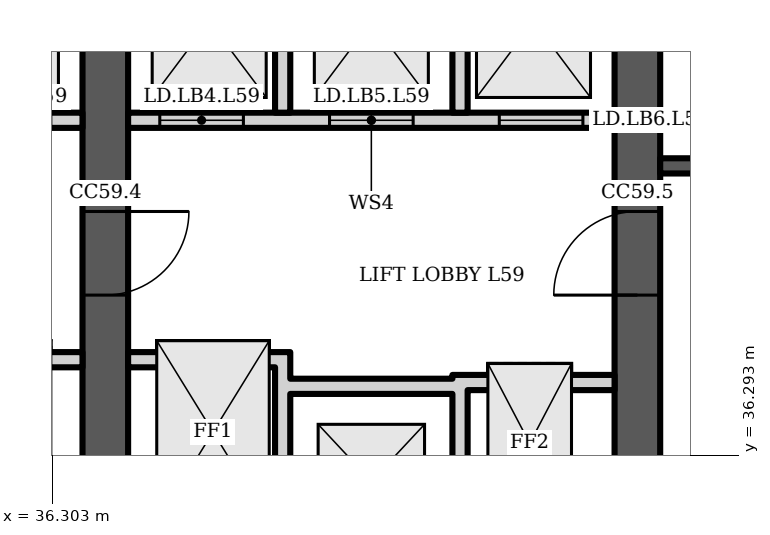
"""IFC4 building model, lengths in metres.
Left out: names, types, materials, properties, quantities, classifications, styles, units other than length and angle.
Written with IfcOpenShell. Run it as: python <this file> out.ifc"""

import sys

from ifc_helpers import new_model, si_unit, direction, frame, frame_2d, origin, place, context, subcontext, project, spatial, polyline, rectangle, outline, extrude, element, fill, save


model = new_model("IFC4")
c1 = context("Model", 3, precision=1e-05, world=origin(), true_north=direction((0.0, 1.0)))
c2 = subcontext(c1, "Body", "Model", "MODEL_VIEW")
j1 = project(units=[si_unit("LENGTHUNIT", "METRE"), si_unit("PLANEANGLEUNIT", "RADIAN")], contexts=[c1])
p1 = place(None, origin())
s1 = spatial("IfcSite", under=j1, at=p1, CompositionType="ELEMENT")
p2 = place(p1, origin())
s2 = spatial("IfcBuilding", under=s1, at=p2, CompositionType="ELEMENT")
p3 = place(p2, frame((0.0, 0.0, 235.9)))
s3 = spatial("IfcBuildingStorey", under=s2, at=p3, CompositionType="ELEMENT", Elevation=235.9)
p4 = place(p3, frame((37.0, 34.6, 0.0), z_axis=(0.0, 0.0, 1.0), x_axis=(0.0, 1.0, 0.0)))
e1 = element("IfcWall", 1, at=p4, inside=s3, PredefinedType="SHEAR", context=c2, shape_type="SweptSolid", body=[
    extrude(rectangle(XDim=14.784, YDim=0.6, at=frame_2d((7.392, 0.0))), origin(), (0.0, 0.0, 1.0), 3.6),
])
p5 = place(p4, frame((11.302, 0.0, 0.0)))
e2 = element("IfcOpeningElement", 2, at=p5, cuts=e1, PredefinedType="OPENING", context=c2, shape_type="SweptSolid", body=[
    extrude(rectangle(XDim=1.0, YDim=2.1, at=frame_2d((0.5, 1.05))), frame((0.0, 0.31, 0.0), z_axis=(0.0, -1.0, 0.0), x_axis=(1.0, 0.0, 0.0)), (0.0, 0.0, 1.0), 0.62),
])
p6 = place(p4, frame((3.8, 0.0, 0.0)))
e3 = element("IfcOpeningElement", 3, at=p6, cuts=e1, PredefinedType="OPENING", context=c2, shape_type="SweptSolid", body=[
    extrude(rectangle(XDim=1.1, YDim=2.1, at=frame_2d((0.55, 1.05))), frame((0.0, 0.31, 0.0), z_axis=(0.0, -1.0, 0.0), x_axis=(1.0, 0.0, 0.0)), (0.0, 0.0, 1.0), 0.62),
])
p7 = place(p3, frame((44.0, 34.6, 0.0), z_axis=(0.0, 0.0, 1.0), x_axis=(0.0, 1.0, 0.0)))
e4 = element("IfcWall", 4, at=p7, inside=s3, PredefinedType="SHEAR", context=c2, shape_type="SweptSolid", body=[
    extrude(rectangle(XDim=14.784, YDim=0.6, at=frame_2d((7.392, 0.0))), origin(), (0.0, 0.0, 1.0), 3.6),
])
p8 = place(p7, frame((11.608, 0.0, 0.0)))
e5 = element("IfcOpeningElement", 5, at=p8, cuts=e4, PredefinedType="OPENING", context=c2, shape_type="SweptSolid", body=[
    extrude(rectangle(XDim=1.0, YDim=2.1, at=frame_2d((0.5, 1.05))), frame((0.0, 0.31, 0.0), z_axis=(0.0, -1.0, 0.0), x_axis=(1.0, 0.0, 0.0)), (0.0, 0.0, 1.0), 0.62),
])
p9 = place(p7, frame((3.8, 0.0, 0.0)))
e6 = element("IfcOpeningElement", 6, at=p9, cuts=e4, PredefinedType="OPENING", context=c2, shape_type="SweptSolid", body=[
    extrude(rectangle(XDim=1.1, YDim=2.1, at=frame_2d((0.55, 1.05))), frame((0.0, 0.31, 0.0), z_axis=(0.0, -1.0, 0.0), x_axis=(1.0, 0.0, 0.0)), (0.0, 0.0, 1.0), 0.62),
])
p10 = place(p3, frame((30.3, 40.7, 0.0), z_axis=(0.0, 0.0, 1.0), x_axis=(1.0, 0.0, 0.0)))
e7 = element("IfcWall", 7, at=p10, inside=s3, PredefinedType="PARTITIONING", context=c2, shape_type="SweptSolid", body=[
    extrude(rectangle(XDim=6.4, YDim=0.2, at=frame_2d((3.2, 0.0))), origin(), (0.0, 0.0, 1.0), 3.2),
])
p11 = place(p10, frame((0.417, 0.0, 0.0)))
e8 = element("IfcOpeningElement", 8, at=p11, cuts=e7, PredefinedType="OPENING", context=c2, shape_type="SweptSolid", body=[
    extrude(rectangle(XDim=1.1, YDim=2.1, at=frame_2d((0.55, 1.05))), frame((0.0, 0.11, 0.0), z_axis=(0.0, -1.0, 0.0), x_axis=(1.0, 0.0, 0.0)), (0.0, 0.0, 1.0), 0.22),
])
p12 = place(p10, frame((2.65, 0.0, 0.0)))
e9 = element("IfcOpeningElement", 9, at=p12, cuts=e7, PredefinedType="OPENING", context=c2, shape_type="SweptSolid", body=[
    extrude(rectangle(XDim=1.1, YDim=2.1, at=frame_2d((0.55, 1.05))), frame((0.0, 0.11, 0.0), z_axis=(0.0, -1.0, 0.0), x_axis=(1.0, 0.0, 0.0)), (0.0, 0.0, 1.0), 0.22),
])
p13 = place(p10, frame((4.883, 0.0, 0.0)))
e10 = element("IfcOpeningElement", 10, at=p13, cuts=e7, PredefinedType="OPENING", context=c2, shape_type="SweptSolid", body=[
    extrude(rectangle(XDim=1.1, YDim=2.1, at=frame_2d((0.55, 1.05))), frame((0.0, 0.11, 0.0), z_axis=(0.0, -1.0, 0.0), x_axis=(1.0, 0.0, 0.0)), (0.0, 0.0, 1.0), 0.22),
])
p14 = place(p3, origin())
e11 = element("IfcWall", 11, at=p14, inside=s3, PredefinedType="PARTITIONING", context=c2, shape_type="SweptSolid", body=[
    extrude(outline(polyline([(34.567, 37.65), (34.767, 37.65), (36.7, 37.65), (36.7, 37.45), (34.767, 37.45), (34.767, 34.6), (34.567, 34.6), (34.567, 37.65)])), origin(), (0.0, 0.0, 1.0), 3.2),
])
p15 = place(p3, origin())
e12 = element("IfcWall", 12, at=p15, inside=s3, PredefinedType="PARTITIONING", context=c2, shape_type="SweptSolid", body=[
    extrude(outline(polyline([(32.433, 40.8), (32.233, 40.8), (32.233, 43.8), (30.3, 43.8), (30.3, 44.0), (36.7, 44.0), (36.7, 43.8), (34.767, 43.8), (34.767, 40.8), (34.567, 40.8), (34.567, 43.8), (32.433, 43.8), (32.433, 40.8)])), origin(), (0.0, 0.0, 1.0), 3.2),
])
p16 = place(p3, frame((37.3, 40.7, 0.0), z_axis=(0.0, 0.0, 1.0), x_axis=(1.0, 0.0, 0.0)))
e13 = element("IfcWall", 13, at=p16, inside=s3, PredefinedType="PARTITIONING", context=c2, shape_type="SweptSolid", body=[
    extrude(rectangle(XDim=6.4, YDim=0.2, at=frame_2d((3.2, 0.0))), origin(), (0.0, 0.0, 1.0), 3.2),
])
p17 = place(p16, frame((0.417, 0.0, 0.0)))
e14 = element("IfcOpeningElement", 14, at=p17, cuts=e13, PredefinedType="OPENING", context=c2, shape_type="SweptSolid", body=[
    extrude(rectangle(XDim=1.1, YDim=2.1, at=frame_2d((0.55, 1.05))), frame((0.0, 0.11, 0.0), z_axis=(0.0, -1.0, 0.0), x_axis=(1.0, 0.0, 0.0)), (0.0, 0.0, 1.0), 0.22),
])
p18 = place(p16, frame((2.65, 0.0, 0.0)))
e15 = element("IfcOpeningElement", 15, at=p18, cuts=e13, PredefinedType="OPENING", context=c2, shape_type="SweptSolid", body=[
    extrude(rectangle(XDim=1.1, YDim=2.1, at=frame_2d((0.55, 1.05))), frame((0.0, 0.11, 0.0), z_axis=(0.0, -1.0, 0.0), x_axis=(1.0, 0.0, 0.0)), (0.0, 0.0, 1.0), 0.22),
])
p19 = place(p16, frame((4.883, 0.0, 0.0)))
e16 = element("IfcOpeningElement", 16, at=p19, cuts=e13, PredefinedType="OPENING", context=c2, shape_type="SweptSolid", body=[
    extrude(rectangle(XDim=1.1, YDim=2.1, at=frame_2d((0.55, 1.05))), frame((0.0, 0.11, 0.0), z_axis=(0.0, -1.0, 0.0), x_axis=(1.0, 0.0, 0.0)), (0.0, 0.0, 1.0), 0.22),
])
p20 = place(p3, origin())
e17 = element("IfcWall", 17, at=p20, inside=s3, PredefinedType="PARTITIONING", context=c2, shape_type="SweptSolid", body=[
    extrude(outline(polyline([(41.567, 37.1), (39.433, 37.1), (39.433, 34.6), (39.233, 34.6), (39.233, 37.45), (37.3, 37.45), (37.3, 37.65), (39.233, 37.65), (39.433, 37.65), (39.433, 37.3), (41.567, 37.3), (41.567, 37.35), (41.767, 37.35), (43.7, 37.35), (43.7, 37.15), (41.767, 37.15), (41.767, 34.6), (41.567, 34.6), (41.567, 37.1)])), origin(), (0.0, 0.0, 1.0), 3.2),
])
p21 = place(p3, origin())
e18 = element("IfcWall", 18, at=p21, inside=s3, PredefinedType="PARTITIONING", context=c2, shape_type="SweptSolid", body=[
    extrude(outline(polyline([(39.433, 40.8), (39.233, 40.8), (39.233, 43.8), (37.3, 43.8), (37.3, 44.0), (43.7, 44.0), (43.7, 43.8), (41.767, 43.8), (41.767, 40.8), (41.567, 40.8), (41.567, 43.8), (39.433, 43.8), (39.433, 40.8)])), origin(), (0.0, 0.0, 1.0), 3.2),
])
p22 = place(p3, frame((44.3, 40.1, 0.0), z_axis=(0.0, 0.0, 1.0), x_axis=(1.0, 0.0, 0.0)))
e19 = element("IfcWall", 19, at=p22, inside=s3, PredefinedType="SHEAR", context=c2, shape_type="SweptSolid", body=[
    extrude(rectangle(XDim=6.4, YDim=0.2, at=frame_2d((3.2, 0.0))), origin(), (0.0, 0.0, 1.0), 3.2),
])
p23 = place(p22, frame((3.625, 0.0, 0.0)))
e20 = element("IfcOpeningElement", 20, at=p23, cuts=e19, PredefinedType="OPENING", context=c2, shape_type="SweptSolid", body=[
    extrude(rectangle(XDim=1.2, YDim=2.1, at=frame_2d((0.6, 1.05))), frame((0.0, 0.11, 0.0), z_axis=(0.0, -1.0, 0.0), x_axis=(1.0, 0.0, 0.0)), (0.0, 0.0, 1.0), 0.22),
])
p24 = place(p22, frame((0.625, 0.0, 0.0)))
e21 = element("IfcOpeningElement", 21, at=p24, cuts=e19, PredefinedType="OPENING", context=c2, shape_type="SweptSolid", body=[
    extrude(rectangle(XDim=0.9, YDim=2.1, at=frame_2d((0.45, 1.05))), frame((0.0, 0.11, 0.0), z_axis=(0.0, -1.0, 0.0), x_axis=(1.0, 0.0, 0.0)), (0.0, 0.0, 1.0), 0.22),
])
p25 = place(p17, origin())
e22 = element("IfcDoor", 22, at=p25, inside=s3, OperationType="DOUBLE_DOOR_SLIDING", PredefinedType="DOOR", context=c2, shape_type="SweptSolid", body=[
    extrude(rectangle(XDim=1.1, YDim=2.1, at=frame_2d((0.55, 1.05))), frame((0.0, 0.025, 0.0), z_axis=(0.0, -1.0, 0.0), x_axis=(1.0, 0.0, 0.0)), (0.0, 0.0, 1.0), 0.05),
])
fill(e14, e22)
p26 = place(p18, origin())
e23 = element("IfcDoor", 23, at=p26, inside=s3, OperationType="DOUBLE_DOOR_SLIDING", PredefinedType="DOOR", context=c2, shape_type="SweptSolid", body=[
    extrude(rectangle(XDim=1.1, YDim=2.1, at=frame_2d((0.55, 1.05))), frame((0.0, 0.025, 0.0), z_axis=(0.0, -1.0, 0.0), x_axis=(1.0, 0.0, 0.0)), (0.0, 0.0, 1.0), 0.05),
])
fill(e15, e23)
p27 = place(p19, origin())
e24 = element("IfcDoor", 24, at=p27, inside=s3, OperationType="DOUBLE_DOOR_SLIDING", PredefinedType="DOOR", context=c2, shape_type="SweptSolid", body=[
    extrude(rectangle(XDim=1.1, YDim=2.1, at=frame_2d((0.55, 1.05))), frame((0.0, 0.025, 0.0), z_axis=(0.0, -1.0, 0.0), x_axis=(1.0, 0.0, 0.0)), (0.0, 0.0, 1.0), 0.05),
])
fill(e16, e24)
p28 = place(p6, origin())
e25 = element("IfcDoor", 25, at=p28, inside=s3, OperationType="SINGLE_SWING_RIGHT", PredefinedType="DOOR", context=c2, shape_type="SweptSolid", body=[
    extrude(rectangle(XDim=1.1, YDim=2.1, at=frame_2d((0.55, 1.05))), frame((0.0, 0.025, 0.0), z_axis=(0.0, -1.0, 0.0), x_axis=(1.0, 0.0, 0.0)), (0.0, 0.0, 1.0), 0.05),
])
fill(e3, e25)
p29 = place(p9, origin())
e26 = element("IfcDoor", 26, at=p29, inside=s3, OperationType="SINGLE_SWING_LEFT", PredefinedType="DOOR", context=c2, shape_type="SweptSolid", body=[
    extrude(rectangle(XDim=1.1, YDim=2.1, at=frame_2d((0.55, 1.05))), frame((0.0, 0.025, 0.0), z_axis=(0.0, -1.0, 0.0), x_axis=(1.0, 0.0, 0.0)), (0.0, 0.0, 1.0), 0.05),
])
fill(e6, e26)
save(model, sys.argv[1])
